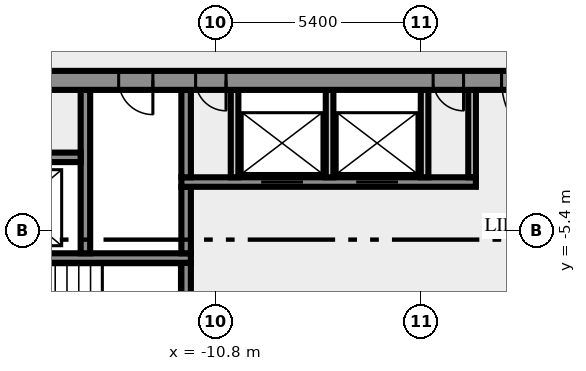
"""IFC4 building model, lengths in metres.
Left out: names, types, materials, properties, quantities, classifications, styles, units other than length and angle.
Written with IfcOpenShell. Run it as: python <this file> out.ifc"""

import sys

from ifc_helpers import new_model, si_unit, direction, frame, frame_2d, origin, place, context, subcontext, project, spatial, rectangle, extrude, element, fill, save


model = new_model("IFC4")
c1 = context("Model", 3, precision=1e-05, world=origin(), true_north=direction((0.0, 1.0)))
c2 = subcontext(c1, "Body", "Model", "MODEL_VIEW")
j1 = project(units=[si_unit("LENGTHUNIT", "METRE"), si_unit("PLANEANGLEUNIT", "RADIAN")], contexts=[c1])
p1 = place(None, origin())
s1 = spatial("IfcSite", under=j1, at=p1, CompositionType="ELEMENT")
p2 = place(p1, origin())
s2 = spatial("IfcBuilding", under=s1, at=p2, CompositionType="ELEMENT")
p3 = place(p2, frame((0.0, 0.0, 285.0)))
s3 = spatial("IfcBuildingStorey", under=s2, at=p3, CompositionType="ELEMENT", Elevation=285.0)
p4 = place(p3, frame((-11.575, -7.25, 0.0), z_axis=(0.0, 0.0, 1.0), x_axis=(0.0, 1.0, 0.0)))
e1 = element("IfcWall", 1, at=p4, inside=s3, PredefinedType="SHEAR", context=c2, shape_type="SweptSolid", body=[
    extrude(rectangle(XDim=1.0, YDim=0.25, at=frame_2d((0.5, 0.0))), origin(), (0.0, 0.0, 1.0), 3.65),
])
p5 = place(p3, frame((-11.45, -6.125, 0.0), z_axis=(0.0, 0.0, 1.0), x_axis=(-1.0, 0.0, 0.0)))
e2 = element("IfcWall", 2, at=p5, inside=s3, PredefinedType="SHEAR", context=c2, shape_type="SweptSolid", body=[
    extrude(rectangle(XDim=8.05, YDim=0.25, at=frame_2d((4.025, 0.0))), origin(), (0.0, 0.0, 1.0), 3.65),
])
p6 = place(p5, frame((6.2, 0.0, 0.0)))
e3 = element("IfcOpeningElement", 3, at=p6, cuts=e2, PredefinedType="OPENING", context=c2, shape_type="SweptSolid", body=[
    extrude(rectangle(XDim=1.8, YDim=2.1, at=frame_2d((0.9, 1.05))), frame((0.0, 0.135, 0.0), z_axis=(0.0, -1.0, 0.0), x_axis=(1.0, 0.0, 0.0)), (0.0, 0.0, 1.0), 0.27),
])
p7 = place(p3, frame((-14.225, -6.0, 0.0), z_axis=(0.0, 0.0, 1.0), x_axis=(0.0, 1.0, 0.0)))
e4 = element("IfcWall", 4, at=p7, inside=s3, PredefinedType="SHEAR", context=c2, shape_type="SweptSolid", body=[
    extrude(rectangle(XDim=4.3, YDim=0.25, at=frame_2d((2.15, 0.0))), origin(), (0.0, 0.0, 1.0), 3.65),
])
p8 = place(p3, frame((-11.575, -6.0, 0.0), z_axis=(0.0, 0.0, 1.0), x_axis=(0.0, 1.0, 0.0)))
e5 = element("IfcWall", 5, at=p8, inside=s3, PredefinedType="SHEAR", context=c2, shape_type="SweptSolid", body=[
    extrude(rectangle(XDim=1.75, YDim=0.25, at=frame_2d((0.875, 0.0))), origin(), (0.0, 0.0, 1.0), 3.65),
])
p9 = place(p3, frame((-11.7, -4.125, 0.0), z_axis=(0.0, 0.0, 1.0), x_axis=(1.0, 0.0, 0.0)))
e6 = element("IfcWall", 6, at=p9, inside=s3, PredefinedType="SHEAR", context=c2, shape_type="SweptSolid", body=[
    extrude(rectangle(XDim=7.75, YDim=0.25, at=frame_2d((3.875, 0.0))), origin(), (0.0, 0.0, 1.0), 3.65),
])
p10 = place(p9, frame((2.1, 0.0, 0.0)))
e7 = element("IfcOpeningElement", 7, at=p10, cuts=e6, PredefinedType="OPENING", context=c2, shape_type="SweptSolid", body=[
    extrude(rectangle(XDim=1.1, YDim=2.1, at=frame_2d((0.55, 1.05))), frame((0.0, 0.135, 0.0), z_axis=(0.0, -1.0, 0.0), x_axis=(1.0, 0.0, 0.0)), (0.0, 0.0, 1.0), 0.27),
])
p11 = place(p9, frame((4.6, 0.0, 0.0)))
e8 = element("IfcOpeningElement", 8, at=p11, cuts=e6, PredefinedType="OPENING", context=c2, shape_type="SweptSolid", body=[
    extrude(rectangle(XDim=1.1, YDim=2.1, at=frame_2d((0.55, 1.05))), frame((0.0, 0.135, 0.0), z_axis=(0.0, -1.0, 0.0), x_axis=(1.0, 0.0, 0.0)), (0.0, 0.0, 1.0), 0.27),
])
p12 = place(p3, frame((-11.575, -4.0, 0.0), z_axis=(0.0, 0.0, 1.0), x_axis=(0.0, 1.0, 0.0)))
e9 = element("IfcWall", 9, at=p12, inside=s3, PredefinedType="SHEAR", context=c2, shape_type="SweptSolid", body=[
    extrude(rectangle(XDim=2.3, YDim=0.25, at=frame_2d((1.15, 0.0))), origin(), (0.0, 0.0, 1.0), 3.65),
])
for number, where, z_axis, x_axis in (
    (10, (-10.3, -4.0, 0.0), (0.0, 0.0, 1.0), (0.0, 1.0, 0.0)),
    (11, (-7.8, -4.0, 0.0), (0.0, 0.0, 1.0), (0.0, 1.0, 0.0)),
    (12, (-5.3, -4.0, 0.0), (0.0, 0.0, 1.0), (0.0, 1.0, 0.0)),
    (13, (-4.05, -4.0, 0.0), (0.0, 0.0, 1.0), (0.0, 1.0, 0.0)),
):
    element("IfcWall", number, at=place(p3, frame(where, z_axis=z_axis, x_axis=x_axis)), inside=s3, PredefinedType="SOLIDWALL", context=c2, shape_type="SweptSolid", body=[
        extrude(rectangle(XDim=2.3, YDim=0.2, at=frame_2d((1.15, 0.0))), origin(), (0.0, 0.0, 1.0), 3.65),
    ])
p13 = place(p3, frame((-17.35, -3.475, 0.0), z_axis=(0.0, 0.0, 1.0), x_axis=(1.0, 0.0, 0.0)))
e14 = element("IfcWall", 14, at=p13, inside=s3, PredefinedType="SHEAR", context=c2, shape_type="SweptSolid", body=[
    extrude(rectangle(XDim=3.0, YDim=0.25, at=frame_2d((1.5, 0.0))), origin(), (0.0, 0.0, 1.0), 3.65),
])
p14 = place(p3, frame((20.49, -1.45, 0.0), z_axis=(0.0, 0.0, 1.0), x_axis=(-1.0, 0.0, 0.0)))
e15 = element("IfcWall", 15, at=p14, inside=s3, PredefinedType="SHEAR", context=c2, shape_type="SweptSolid", body=[
    extrude(rectangle(XDim=40.98, YDim=0.5, at=frame_2d((20.49, 0.0))), origin(), (0.0, 0.0, 1.0), 3.65),
])
p15 = place(p14, frame((38.14, 0.0, 0.0)))
e16 = element("IfcOpeningElement", 16, at=p15, cuts=e15, PredefinedType="OPENING", context=c2, shape_type="SweptSolid", body=[
    extrude(rectangle(XDim=1.8, YDim=2.1, at=frame_2d((0.9, 1.05))), frame((0.0, 0.26, 0.0), z_axis=(0.0, -1.0, 0.0), x_axis=(1.0, 0.0, 0.0)), (0.0, 0.0, 1.0), 0.52),
])
p16 = place(p14, frame((35.89, 0.0, 0.0)))
e17 = element("IfcOpeningElement", 17, at=p16, cuts=e15, PredefinedType="OPENING", context=c2, shape_type="SweptSolid", body=[
    extrude(rectangle(XDim=0.9, YDim=2.1, at=frame_2d((0.45, 1.05))), frame((0.0, 0.26, 0.0), z_axis=(0.0, -1.0, 0.0), x_axis=(1.0, 0.0, 0.0)), (0.0, 0.0, 1.0), 0.52),
])
p17 = place(p14, frame((32.94, 0.0, 0.0)))
e18 = element("IfcOpeningElement", 18, at=p17, cuts=e15, PredefinedType="OPENING", context=c2, shape_type="SweptSolid", body=[
    extrude(rectangle(XDim=0.9, YDim=2.1, at=frame_2d((0.45, 1.05))), frame((0.0, 0.26, 0.0), z_axis=(0.0, -1.0, 0.0), x_axis=(1.0, 0.0, 0.0)), (0.0, 0.0, 1.0), 0.52),
])
p18 = place(p14, frame((31.015, 0.0, 0.0)))
e19 = element("IfcOpeningElement", 19, at=p18, cuts=e15, PredefinedType="OPENING", context=c2, shape_type="SweptSolid", body=[
    extrude(rectangle(XDim=0.8, YDim=2.1, at=frame_2d((0.4, 1.05))), frame((0.0, 0.26, 0.0), z_axis=(0.0, -1.0, 0.0), x_axis=(1.0, 0.0, 0.0)), (0.0, 0.0, 1.0), 0.52),
])
p19 = place(p14, frame((24.765, 0.0, 0.0)))
e20 = element("IfcOpeningElement", 20, at=p19, cuts=e15, PredefinedType="OPENING", context=c2, shape_type="SweptSolid", body=[
    extrude(rectangle(XDim=0.8, YDim=2.1, at=frame_2d((0.4, 1.05))), frame((0.0, 0.26, 0.0), z_axis=(0.0, -1.0, 0.0), x_axis=(1.0, 0.0, 0.0)), (0.0, 0.0, 1.0), 0.52),
])
p20 = place(p14, frame((21.765, 0.0, 0.0)))
e21 = element("IfcOpeningElement", 21, at=p20, cuts=e15, PredefinedType="OPENING", context=c2, shape_type="SweptSolid", body=[
    extrude(rectangle(XDim=2.0, YDim=2.1, at=frame_2d((1.0, 1.05))), frame((0.0, 0.26, 0.0), z_axis=(0.0, -1.0, 0.0), x_axis=(1.0, 0.0, 0.0)), (0.0, 0.0, 1.0), 0.52),
])
p21 = place(p14, frame((15.202, 0.0, 0.0)))
e22 = element("IfcOpeningElement", 22, at=p21, cuts=e15, PredefinedType="OPENING", context=c2, shape_type="SweptSolid", body=[
    extrude(rectangle(XDim=0.9, YDim=2.1, at=frame_2d((0.45, 1.05))), frame((0.0, 0.26, 0.0), z_axis=(0.0, -1.0, 0.0), x_axis=(1.0, 0.0, 0.0)), (0.0, 0.0, 1.0), 0.52),
])
p22 = place(p14, frame((13.54, 0.0, 0.0)))
e23 = element("IfcOpeningElement", 23, at=p22, cuts=e15, PredefinedType="OPENING", context=c2, shape_type="SweptSolid", body=[
    extrude(rectangle(XDim=0.9, YDim=2.1, at=frame_2d((0.45, 1.05))), frame((0.0, 0.26, 0.0), z_axis=(0.0, -1.0, 0.0), x_axis=(1.0, 0.0, 0.0)), (0.0, 0.0, 1.0), 0.52),
])
p23 = place(p14, frame((11.64, 0.0, 0.0)))
e24 = element("IfcOpeningElement", 24, at=p23, cuts=e15, PredefinedType="OPENING", context=c2, shape_type="SweptSolid", body=[
    extrude(rectangle(XDim=0.9, YDim=2.1, at=frame_2d((0.45, 1.05))), frame((0.0, 0.26, 0.0), z_axis=(0.0, -1.0, 0.0), x_axis=(1.0, 0.0, 0.0)), (0.0, 0.0, 1.0), 0.52),
])
p24 = place(p14, frame((9.577, 0.0, 0.0)))
e25 = element("IfcOpeningElement", 25, at=p24, cuts=e15, PredefinedType="OPENING", context=c2, shape_type="SweptSolid", body=[
    extrude(rectangle(XDim=0.9, YDim=2.1, at=frame_2d((0.45, 1.05))), frame((0.0, 0.26, 0.0), z_axis=(0.0, -1.0, 0.0), x_axis=(1.0, 0.0, 0.0)), (0.0, 0.0, 1.0), 0.52),
])
p25 = place(p14, frame((7.14, 0.0, 0.0)))
e26 = element("IfcOpeningElement", 26, at=p25, cuts=e15, PredefinedType="OPENING", context=c2, shape_type="SweptSolid", body=[
    extrude(rectangle(XDim=0.9, YDim=2.1, at=frame_2d((0.45, 1.05))), frame((0.0, 0.26, 0.0), z_axis=(0.0, -1.0, 0.0), x_axis=(1.0, 0.0, 0.0)), (0.0, 0.0, 1.0), 0.52),
])
p26 = place(p14, frame((5.028, 0.0, 0.0)))
e27 = element("IfcOpeningElement", 27, at=p26, cuts=e15, PredefinedType="OPENING", context=c2, shape_type="SweptSolid", body=[
    extrude(rectangle(XDim=0.8, YDim=2.1, at=frame_2d((0.4, 1.05))), frame((0.0, 0.26, 0.0), z_axis=(0.0, -1.0, 0.0), x_axis=(1.0, 0.0, 0.0)), (0.0, 0.0, 1.0), 0.52),
])
p27 = place(p14, frame((3.452, 0.0, 0.0)))
e28 = element("IfcOpeningElement", 28, at=p27, cuts=e15, PredefinedType="OPENING", context=c2, shape_type="SweptSolid", body=[
    extrude(rectangle(XDim=0.8, YDim=2.1, at=frame_2d((0.4, 1.05))), frame((0.0, 0.26, 0.0), z_axis=(0.0, -1.0, 0.0), x_axis=(1.0, 0.0, 0.0)), (0.0, 0.0, 1.0), 0.52),
])
p28 = place(p14, frame((1.04, 0.0, 0.0)))
e29 = element("IfcOpeningElement", 29, at=p28, cuts=e15, PredefinedType="OPENING", context=c2, shape_type="SweptSolid", body=[
    extrude(rectangle(XDim=1.8, YDim=2.1, at=frame_2d((0.9, 1.05))), frame((0.0, 0.26, 0.0), z_axis=(0.0, -1.0, 0.0), x_axis=(1.0, 0.0, 0.0)), (0.0, 0.0, 1.0), 0.52),
])
p29 = place(p10, origin())
e30 = element("IfcDoor", 30, at=p29, inside=s3, OperationType="DOUBLE_DOOR_SLIDING", PredefinedType="DOOR", context=c2, shape_type="SweptSolid", body=[
    extrude(rectangle(XDim=1.1, YDim=2.1, at=frame_2d((0.55, 1.05))), frame((0.0, 0.025, 0.0), z_axis=(0.0, -1.0, 0.0), x_axis=(1.0, 0.0, 0.0)), (0.0, 0.0, 1.0), 0.05),
])
fill(e7, e30)
p30 = place(p11, origin())
e31 = element("IfcDoor", 31, at=p30, inside=s3, OperationType="DOUBLE_DOOR_SLIDING", PredefinedType="DOOR", context=c2, shape_type="SweptSolid", body=[
    extrude(rectangle(XDim=1.1, YDim=2.1, at=frame_2d((0.55, 1.05))), frame((0.0, 0.025, 0.0), z_axis=(0.0, -1.0, 0.0), x_axis=(1.0, 0.0, 0.0)), (0.0, 0.0, 1.0), 0.05),
])
fill(e8, e31)
p31 = place(p17, origin())
e32 = element("IfcDoor", 32, at=p31, inside=s3, OperationType="SINGLE_SWING_RIGHT", PredefinedType="DOOR", context=c2, shape_type="SweptSolid", body=[
    extrude(rectangle(XDim=0.9, YDim=2.1, at=frame_2d((0.45, 1.05))), frame((0.0, 0.025, 0.0), z_axis=(0.0, -1.0, 0.0), x_axis=(1.0, 0.0, 0.0)), (0.0, 0.0, 1.0), 0.05),
])
fill(e18, e32)
p32 = place(p18, origin())
e33 = element("IfcDoor", 33, at=p32, inside=s3, OperationType="SINGLE_SWING_RIGHT", PredefinedType="DOOR", context=c2, shape_type="SweptSolid", body=[
    extrude(rectangle(XDim=0.8, YDim=2.1, at=frame_2d((0.4, 1.05))), frame((0.0, 0.025, 0.0), z_axis=(0.0, -1.0, 0.0), x_axis=(1.0, 0.0, 0.0)), (0.0, 0.0, 1.0), 0.05),
])
fill(e19, e33)
p33 = place(p19, origin())
e34 = element("IfcDoor", 34, at=p33, inside=s3, OperationType="SINGLE_SWING_RIGHT", PredefinedType="DOOR", context=c2, shape_type="SweptSolid", body=[
    extrude(rectangle(XDim=0.8, YDim=2.1, at=frame_2d((0.4, 1.05))), frame((0.0, 0.025, 0.0), z_axis=(0.0, -1.0, 0.0), x_axis=(1.0, 0.0, 0.0)), (0.0, 0.0, 1.0), 0.05),
])
fill(e20, e34)
p34 = place(p20, origin())
e35 = element("IfcDoor", 35, at=p34, inside=s3, OperationType="DOUBLE_DOOR_SINGLE_SWING", PredefinedType="DOOR", context=c2, shape_type="SweptSolid", body=[
    extrude(rectangle(XDim=2.0, YDim=2.1, at=frame_2d((1.0, 1.05))), frame((0.0, 0.025, 0.0), z_axis=(0.0, -1.0, 0.0), x_axis=(1.0, 0.0, 0.0)), (0.0, 0.0, 1.0), 0.05),
])
fill(e21, e35)
save(model, sys.argv[1])
